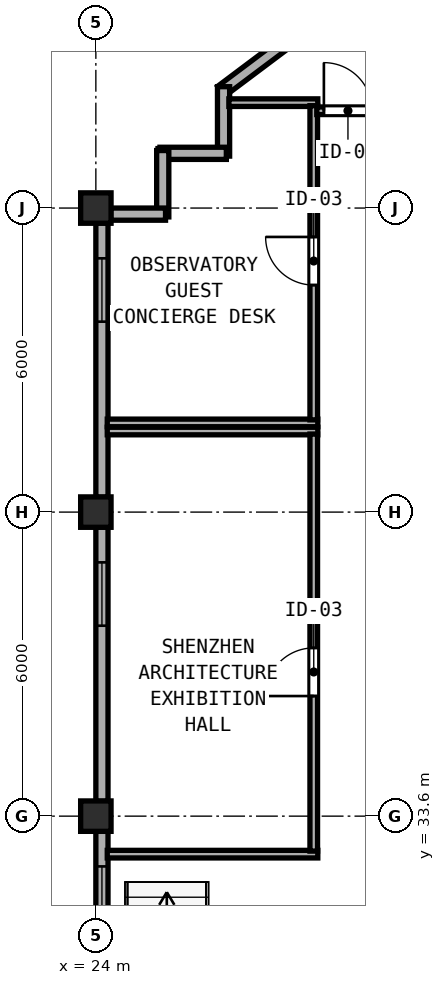
"""IFC4 building model, lengths in metres.
Left out: names, types, materials, properties, quantities, classifications, styles, units other than length and angle.
Written with IfcOpenShell. Run it as: python <this file> out.ifc"""

import sys

from ifc_helpers import new_model, si_unit, direction, frame, frame_2d, origin, origin_2d, place, context, subcontext, project, spatial, rectangle, hollow_rectangle, extrude, element, fill, save


model = new_model("IFC4")
c1 = context("Model", 3, precision=1e-05, world=origin(), true_north=direction((0.0, 1.0)))
c2 = subcontext(c1, "Body", "Model", "MODEL_VIEW")
j1 = project(units=[si_unit("LENGTHUNIT", "METRE"), si_unit("PLANEANGLEUNIT", "RADIAN")], contexts=[c1])
p1 = place(None, origin())
s1 = spatial("IfcSite", under=j1, at=p1, CompositionType="ELEMENT")
p2 = place(p1, origin())
s2 = spatial("IfcBuilding", under=s1, at=p2, CompositionType="ELEMENT")
p3 = place(p2, frame((0.0, 0.0, 318.2)))
s3 = spatial("IfcBuildingStorey", under=s2, at=p3, CompositionType="ELEMENT", Elevation=318.2)
for number, where, z_axis, x_axis in (
    (1, (24.0, 33.6, 0.0), (0.0, 0.0, 1.0), (1.0, 0.0, 0.0)),
    (2, (24.0, 45.6, 0.0), (0.0, 0.0, 1.0), (1.0, 0.0, 0.0)),
    (3, (24.0, 39.6, 0.0), (0.0, 0.0, 1.0), (1.0, 0.0, 0.0)),
):
    element("IfcColumn", number, at=place(p3, frame(where, z_axis=z_axis, x_axis=x_axis)), inside=s3, PredefinedType="COLUMN", context=c2, shape_type="SweptSolid", body=[
        extrude(hollow_rectangle(XDim=0.6, YDim=0.6, WallThickness=0.024, at=origin_2d()), origin(), (0.0, 0.0, 1.0), 5.0),
    ])
p4 = place(p3, frame((31.292, 51.519, 0.0), z_axis=(0.0, 0.0, 1.0), x_axis=(-0.8, -0.6, 0.0)))
e4 = element("IfcWall", 4, at=p4, inside=s3, PredefinedType="SOLIDWALL", context=c2, shape_type="SweptSolid", body=[
    extrude(rectangle(XDim=6.021, YDim=0.24, at=frame_2d((3.01, 0.0))), origin(), (0.0, 0.0, 1.0), 4.76),
])
p5 = place(p4, frame((0.7, 0.0, 0.85)))
e5 = element("IfcOpeningElement", 5, at=p5, cuts=e4, PredefinedType="OPENING", context=c2, shape_type="SweptSolid", body=[
    extrude(rectangle(XDim=1.25, YDim=1.95, at=frame_2d((0.625, 0.975))), frame((0.0, 0.13, 0.0), z_axis=(0.0, -1.0, 0.0), x_axis=(1.0, 0.0, 0.0)), (0.0, 0.0, 1.0), 0.26),
])
p6 = place(p3, frame((26.52, 47.995, 0.0), z_axis=(0.0, 0.0, 1.0), x_axis=(0.0, -1.0, 0.0)))
e6 = element("IfcWall", 6, at=p6, inside=s3, PredefinedType="SOLIDWALL", context=c2, shape_type="SweptSolid", body=[
    extrude(rectangle(XDim=1.37, YDim=0.24, at=frame_2d((0.685, 0.0))), origin(), (0.0, 0.0, 1.0), 4.76),
])
for number, where, z_axis, x_axis in (
    (7, (26.575, 46.68, 0.0), (0.0, 0.0, 1.0), (-1.0, 0.0, 0.0)),
    (8, (25.32, 46.735, 0.0), (0.0, 0.0, 1.0), (0.0, -1.0, 0.0)),
):
    element("IfcWall", number, at=place(p3, frame(where, z_axis=z_axis, x_axis=x_axis)), inside=s3, PredefinedType="SOLIDWALL", context=c2, shape_type="SweptSolid", body=[
        extrude(rectangle(XDim=1.31, YDim=0.24, at=frame_2d((0.655, 0.0))), origin(), (0.0, 0.0, 1.0), 4.76),
    ])
p7 = place(p3, frame((25.375, 45.48, 0.0), z_axis=(0.0, 0.0, 1.0), x_axis=(-1.0, 0.0, 0.0)))
e9 = element("IfcWall", 9, at=p7, inside=s3, PredefinedType="SOLIDWALL", context=c2, shape_type="SweptSolid", body=[
    extrude(rectangle(XDim=1.083, YDim=0.24, at=frame_2d((0.542, 0.0))), origin(), (0.0, 0.0, 1.0), 4.76),
])
p8 = place(p3, frame((24.12, 45.308, 0.0), z_axis=(0.0, 0.0, 1.0), x_axis=(0.0, -1.0, 0.0)))
e10 = element("IfcWall", 10, at=p8, inside=s3, PredefinedType="SOLIDWALL", context=c2, shape_type="SweptSolid", body=[
    extrude(rectangle(XDim=5.416, YDim=0.24, at=frame_2d((2.708, 0.0))), origin(), (0.0, 0.0, 1.0), 4.355),
])
p9 = place(p8, frame((0.7, 0.0, 0.85)))
e11 = element("IfcOpeningElement", 11, at=p9, cuts=e10, PredefinedType="OPENING", context=c2, shape_type="SweptSolid", body=[
    extrude(rectangle(XDim=1.25, YDim=1.95, at=frame_2d((0.625, 0.975))), frame((0.0, 0.13, 0.0), z_axis=(0.0, -1.0, 0.0), x_axis=(1.0, 0.0, 0.0)), (0.0, 0.0, 1.0), 0.26),
])
p10 = place(p3, frame((24.12, 39.308, 0.0), z_axis=(0.0, 0.0, 1.0), x_axis=(0.0, -1.0, 0.0)))
e12 = element("IfcWall", 12, at=p10, inside=s3, PredefinedType="SOLIDWALL", context=c2, shape_type="SweptSolid", body=[
    extrude(rectangle(XDim=5.416, YDim=0.24, at=frame_2d((2.708, 0.0))), origin(), (0.0, 0.0, 1.0), 4.355),
])
p11 = place(p10, frame((0.7, 0.0, 0.85)))
e13 = element("IfcOpeningElement", 13, at=p11, cuts=e12, PredefinedType="OPENING", context=c2, shape_type="SweptSolid", body=[
    extrude(rectangle(XDim=1.25, YDim=1.95, at=frame_2d((0.625, 0.975))), frame((0.0, 0.13, 0.0), z_axis=(0.0, -1.0, 0.0), x_axis=(1.0, 0.0, 0.0)), (0.0, 0.0, 1.0), 0.26),
])
p12 = place(p3, frame((24.12, 33.308, 0.0), z_axis=(0.0, 0.0, 1.0), x_axis=(0.0, -1.0, 0.0)))
e14 = element("IfcWall", 14, at=p12, inside=s3, PredefinedType="SOLIDWALL", context=c2, shape_type="SweptSolid", body=[
    extrude(rectangle(XDim=5.416, YDim=0.24, at=frame_2d((2.708, 0.0))), origin(), (0.0, 0.0, 1.0), 4.355),
])
p13 = place(p12, frame((0.7, 0.0, 0.85)))
e15 = element("IfcOpeningElement", 15, at=p13, cuts=e14, PredefinedType="OPENING", context=c2, shape_type="SweptSolid", body=[
    extrude(rectangle(XDim=1.25, YDim=1.95, at=frame_2d((0.625, 0.975))), frame((0.0, 0.13, 0.0), z_axis=(0.0, -1.0, 0.0), x_axis=(1.0, 0.0, 0.0)), (0.0, 0.0, 1.0), 0.26),
])
for number, where, z_axis, x_axis in (
    (16, (24.225, 41.2, 0.0), (0.0, 0.0, 1.0), (1.0, 0.0, 0.0)),
    (17, (24.225, 32.85, 0.0), (0.0, 0.0, 1.0), (1.0, 0.0, 0.0)),
):
    element("IfcWall", number, at=place(p3, frame(where, z_axis=z_axis, x_axis=x_axis)), inside=s3, PredefinedType="PARTITIONING", context=c2, shape_type="SweptSolid", body=[
        extrude(rectangle(XDim=4.155, YDim=0.15, at=frame_2d((2.077, 0.0))), origin(), (0.0, 0.0, 1.0), 4.76),
    ])
p14 = place(p3, frame((28.3, 32.91, 0.0), z_axis=(0.0, 0.0, 1.0), x_axis=(0.0, 1.0, 0.0)))
e18 = element("IfcWall", 18, at=p14, inside=s3, PredefinedType="PARTITIONING", context=c2, shape_type="SweptSolid", body=[
    extrude(rectangle(XDim=8.23, YDim=0.15, at=frame_2d((4.115, 0.0))), origin(), (0.0, 0.0, 1.0), 4.76),
])
p15 = place(p14, frame((4.01, 0.0, 0.0), z_axis=(0.0, 0.0, 1.0), x_axis=(-1.0, 0.0, 0.0)))
e19 = element("IfcOpeningElement", 19, at=p15, cuts=e18, PredefinedType="OPENING", context=c2, shape_type="SweptSolid", body=[
    extrude(rectangle(XDim=0.95, YDim=2.12, at=frame_2d((0.475, 1.06))), frame((0.0, 0.085, 0.0), z_axis=(0.0, -1.0, 0.0), x_axis=(1.0, 0.0, 0.0)), (0.0, 0.0, 1.0), 0.17),
])
p16 = place(p3, frame((26.625, 47.68, 0.0), z_axis=(0.0, 0.0, 1.0), x_axis=(1.0, 0.0, 0.0)))
e20 = element("IfcWall", 20, at=p16, inside=s3, PredefinedType="PARTITIONING", context=c2, shape_type="SweptSolid", body=[
    extrude(rectangle(XDim=1.755, YDim=0.15, at=frame_2d((0.877, 0.0))), origin(), (0.0, 0.0, 1.0), 4.76),
])
p17 = place(p3, frame((24.225, 41.36, 0.0), z_axis=(0.0, 0.0, 1.0), x_axis=(1.0, 0.0, 0.0)))
e21 = element("IfcWall", 21, at=p17, inside=s3, PredefinedType="PARTITIONING", context=c2, shape_type="SweptSolid", body=[
    extrude(rectangle(XDim=4.155, YDim=0.15, at=frame_2d((2.077, 0.0))), origin(), (0.0, 0.0, 1.0), 4.76),
])
p18 = place(p3, frame((28.3, 41.42, 0.0), z_axis=(0.0, 0.0, 1.0), x_axis=(0.0, 1.0, 0.0)))
e22 = element("IfcWall", 22, at=p18, inside=s3, PredefinedType="PARTITIONING", context=c2, shape_type="SweptSolid", body=[
    extrude(rectangle(XDim=6.2, YDim=0.15, at=frame_2d((3.1, 0.0))), origin(), (0.0, 0.0, 1.0), 4.76),
])
p19 = place(p18, frame((3.61, 0.0, 0.0), z_axis=(0.0, 0.0, 1.0), x_axis=(-1.0, 0.0, 0.0)))
e23 = element("IfcOpeningElement", 23, at=p19, cuts=e22, PredefinedType="OPENING", context=c2, shape_type="SweptSolid", body=[
    extrude(rectangle(XDim=0.95, YDim=2.12, at=frame_2d((0.475, 1.06))), frame((0.0, 0.085, 0.0), z_axis=(0.0, -1.0, 0.0), x_axis=(1.0, 0.0, 0.0)), (0.0, 0.0, 1.0), 0.17),
])
p20 = place(p3, frame((28.36, 47.52, 0.0), z_axis=(0.0, 0.0, 1.0), x_axis=(1.0, 0.0, 0.0)))
e24 = element("IfcWall", 24, at=p20, inside=s3, PredefinedType="PARTITIONING", context=c2, shape_type="SweptSolid", body=[
    extrude(rectangle(XDim=5.608, YDim=0.15, at=frame_2d((2.804, 0.0))), origin(), (0.0, 0.0, 1.0), 4.76),
])
p21 = place(p20, frame((0.14, 0.0, 0.0)))
e25 = element("IfcOpeningElement", 25, at=p21, cuts=e24, PredefinedType="OPENING", context=c2, shape_type="SweptSolid", body=[
    extrude(rectangle(XDim=0.95, YDim=2.12, at=frame_2d((0.475, 1.06))), frame((0.0, 0.085, 0.0), z_axis=(0.0, -1.0, 0.0), x_axis=(1.0, 0.0, 0.0)), (0.0, 0.0, 1.0), 0.17),
])
p22 = place(p9, origin())
e26 = element("IfcWindow", 26, at=p22, inside=s3, PartitioningType="SINGLE_PANEL", PredefinedType="WINDOW", context=c2, shape_type="SweptSolid", body=[
    extrude(rectangle(XDim=1.25, YDim=1.95, at=frame_2d((0.625, 0.975))), frame((0.0, 0.03, 0.0), z_axis=(0.0, -1.0, 0.0), x_axis=(1.0, 0.0, 0.0)), (0.0, 0.0, 1.0), 0.06),
])
fill(e11, e26)
p23 = place(p11, origin())
e27 = element("IfcWindow", 27, at=p23, inside=s3, PartitioningType="SINGLE_PANEL", PredefinedType="WINDOW", context=c2, shape_type="SweptSolid", body=[
    extrude(rectangle(XDim=1.25, YDim=1.95, at=frame_2d((0.625, 0.975))), frame((0.0, 0.03, 0.0), z_axis=(0.0, -1.0, 0.0), x_axis=(1.0, 0.0, 0.0)), (0.0, 0.0, 1.0), 0.06),
])
fill(e13, e27)
p24 = place(p13, origin())
e28 = element("IfcWindow", 28, at=p24, inside=s3, PartitioningType="SINGLE_PANEL", PredefinedType="WINDOW", context=c2, shape_type="SweptSolid", body=[
    extrude(rectangle(XDim=1.25, YDim=1.95, at=frame_2d((0.625, 0.975))), frame((0.0, 0.03, 0.0), z_axis=(0.0, -1.0, 0.0), x_axis=(1.0, 0.0, 0.0)), (0.0, 0.0, 1.0), 0.06),
])
fill(e15, e28)
p25 = place(p15, origin())
e29 = element("IfcDoor", 29, at=p25, inside=s3, OperationType="SINGLE_SWING_RIGHT", PredefinedType="DOOR", context=c2, shape_type="SweptSolid", body=[
    extrude(rectangle(XDim=0.95, YDim=2.12, at=frame_2d((0.475, 1.06))), frame((0.0, 0.025, 0.0), z_axis=(0.0, -1.0, 0.0), x_axis=(1.0, 0.0, 0.0)), (0.0, 0.0, 1.0), 0.05),
])
fill(e19, e29)
p26 = place(p19, origin())
e30 = element("IfcDoor", 30, at=p26, inside=s3, OperationType="SINGLE_SWING_LEFT", PredefinedType="DOOR", context=c2, shape_type="SweptSolid", body=[
    extrude(rectangle(XDim=0.95, YDim=2.12, at=frame_2d((0.475, 1.06))), frame((0.0, 0.025, 0.0), z_axis=(0.0, -1.0, 0.0), x_axis=(1.0, 0.0, 0.0)), (0.0, 0.0, 1.0), 0.05),
])
fill(e23, e30)
p27 = place(p21, origin())
e31 = element("IfcDoor", 31, at=p27, inside=s3, OperationType="SINGLE_SWING_LEFT", PredefinedType="DOOR", context=c2, shape_type="SweptSolid", body=[
    extrude(rectangle(XDim=0.95, YDim=2.12, at=frame_2d((0.475, 1.06))), frame((0.0, 0.025, 0.0), z_axis=(0.0, -1.0, 0.0), x_axis=(1.0, 0.0, 0.0)), (0.0, 0.0, 1.0), 0.05),
])
fill(e25, e31)
save(model, sys.argv[1])
